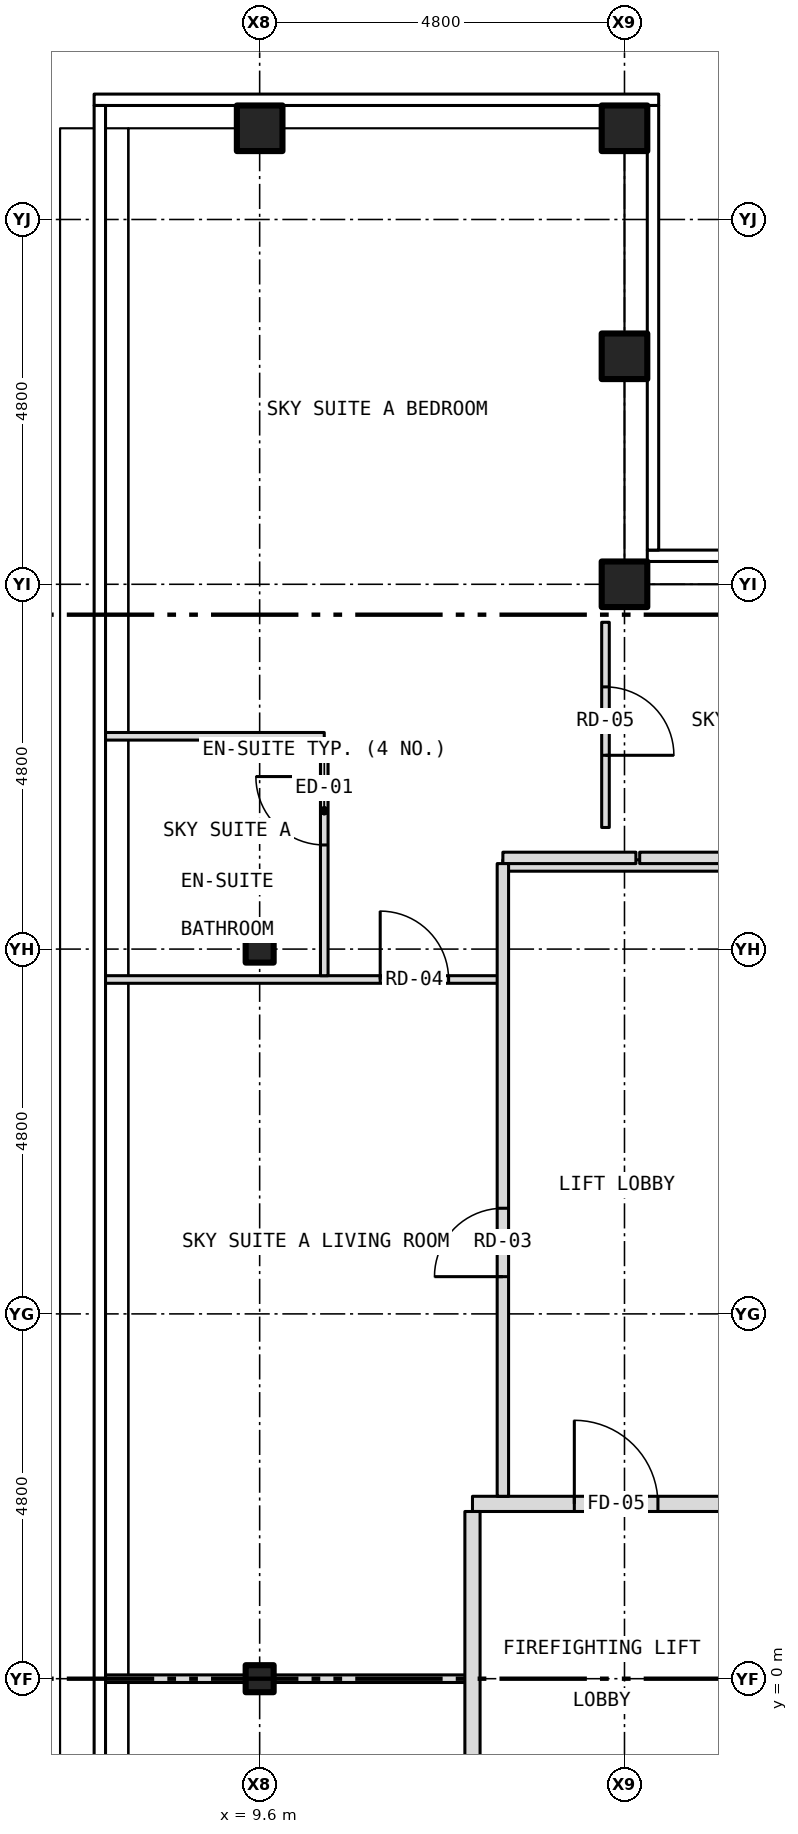
"""IFC4 building model, lengths in metres.
Left out: names, types, materials, properties, quantities, classifications, styles, units other than length and angle.
Written with IfcOpenShell. Run it as: python <this file> out.ifc"""

import sys

from ifc_helpers import new_model, si_unit, direction, frame, frame_2d, origin, origin_2d, place, context, subcontext, project, spatial, rectangle, hollow_rectangle, i_section, extrude, element, fill, save


model = new_model("IFC4")
c1 = context("Model", 3, precision=1e-05, world=origin(), true_north=direction((0.0, 1.0)))
c2 = subcontext(c1, "Body", "Model", "MODEL_VIEW")
j1 = project(units=[si_unit("LENGTHUNIT", "METRE"), si_unit("PLANEANGLEUNIT", "RADIAN")], contexts=[c1])
p1 = place(None, origin())
s1 = spatial("IfcSite", under=j1, at=p1, CompositionType="ELEMENT")
p2 = place(p1, origin())
s2 = spatial("IfcBuilding", under=s1, at=p2, CompositionType="ELEMENT")
p3 = place(p2, frame((0.0, 0.0, 269.0)))
s3 = spatial("IfcBuildingStorey", under=s2, at=p3, CompositionType="ELEMENT", Elevation=269.0)
for number, where, z_axis, x_axis in (
    (1, (9.6, 20.4, -0.15), (0.0, 0.0, 1.0), (1.0, 0.0, 0.0)),
    (2, (14.4, 20.4, -0.15), (0.0, 0.0, 1.0), (1.0, 0.0, 0.0)),
    (3, (14.4, 14.4, -0.15), (0.0, 0.0, 1.0), (1.0, 0.0, 0.0)),
    (4, (14.4, 17.4, -0.15), (0.0, 0.0, 1.0), (1.0, 0.0, 0.0)),
):
    element("IfcColumn", number, at=place(p3, frame(where, z_axis=z_axis, x_axis=x_axis)), inside=s3, PredefinedType="COLUMN", context=c2, shape_type="SweptSolid", body=[
        extrude(hollow_rectangle(XDim=0.6, YDim=0.6, WallThickness=0.03, at=origin_2d()), origin(), (0.0, 0.0, 1.0), 3.5),
    ])
for number, where, z_axis, x_axis in (
    (5, (9.6, 0.0, -0.15), (0.0, 0.0, 1.0), (1.0, 0.0, 0.0)),
    (6, (9.6, 9.6, -0.15), (0.0, 0.0, 1.0), (1.0, 0.0, 0.0)),
):
    element("IfcColumn", number, at=place(p3, frame(where, z_axis=z_axis, x_axis=x_axis)), inside=s3, PredefinedType="COLUMN", context=c2, shape_type="SweptSolid", body=[
        extrude(i_section(OverallWidth=0.368, OverallDepth=0.356, WebThickness=0.011, FlangeThickness=0.018, at=origin_2d()), origin(), (0.0, 0.0, 1.0), 3.5),
    ])
p4 = place(p3, frame((7.542, 0.0, 0.0), z_axis=(0.0, 0.0, 1.0), x_axis=(1.0, 0.0, 0.0)))
e7 = element("IfcWall", 7, at=p4, inside=s3, PredefinedType="PARTITIONING", context=c2, shape_type="SweptSolid", body=[
    extrude(rectangle(XDim=1.874, YDim=0.1, at=frame_2d((0.937, 0.0))), origin(), (0.0, 0.0, 1.0), 2.728),
])
p5 = place(p3, frame((9.416, 0.0, 0.0), z_axis=(0.0, 0.0, 1.0), x_axis=(1.0, 0.0, 0.0)))
e8 = element("IfcWall", 8, at=p5, inside=s3, PredefinedType="PARTITIONING", context=c2, shape_type="SweptSolid", body=[
    extrude(rectangle(XDim=0.368, YDim=0.1, at=frame_2d((0.184, 0.0))), origin(), (0.0, 0.0, 1.0), 3.35),
])
p6 = place(p3, frame((9.784, 0.0, 0.0), z_axis=(0.0, 0.0, 1.0), x_axis=(1.0, 0.0, 0.0)))
e9 = element("IfcWall", 9, at=p6, inside=s3, PredefinedType="PARTITIONING", context=c2, shape_type="SweptSolid", body=[
    extrude(rectangle(XDim=2.616, YDim=0.1, at=frame_2d((1.308, 0.0))), origin(), (0.0, 0.0, 1.0), 2.728),
])
p7 = place(p3, frame((12.4, 2.3, 0.0), z_axis=(0.0, 0.0, 1.0), x_axis=(1.0, 0.0, 0.0)))
e10 = element("IfcWall", 10, at=p7, inside=s3, PredefinedType="PARTITIONING", context=c2, shape_type="SweptSolid", body=[
    extrude(rectangle(XDim=3.28, YDim=0.2, at=frame_2d((1.64, 0.0))), origin(), (0.0, 0.0, 1.0), 3.35),
])
p8 = place(p7, frame((1.34, 0.0, 0.0)))
e11 = element("IfcOpeningElement", 11, at=p8, cuts=e10, PredefinedType="OPENING", context=c2, shape_type="SweptSolid", body=[
    extrude(rectangle(XDim=1.1, YDim=2.1, at=frame_2d((0.55, 1.05))), frame((0.0, 0.112, 0.0), z_axis=(0.0, -1.0, 0.0), x_axis=(1.0, 0.0, 0.0)), (0.0, 0.0, 1.0), 0.224),
])
p9 = place(p3, frame((7.542, 9.2, 0.0), z_axis=(0.0, 0.0, 1.0), x_axis=(1.0, 0.0, 0.0)))
e12 = element("IfcWall", 12, at=p9, inside=s3, PredefinedType="PARTITIONING", context=c2, shape_type="SweptSolid", body=[
    extrude(rectangle(XDim=5.258, YDim=0.1, at=frame_2d((2.629, 0.0))), origin(), (0.0, 0.0, 1.0), 3.35),
])
p10 = place(p9, frame((3.644, 0.0, 0.0)))
e13 = element("IfcOpeningElement", 13, at=p10, cuts=e12, PredefinedType="OPENING", context=c2, shape_type="SweptSolid", body=[
    extrude(rectangle(XDim=0.9, YDim=2.1, at=frame_2d((0.45, 1.05))), frame((0.0, 0.062, 0.0), z_axis=(0.0, -1.0, 0.0), x_axis=(1.0, 0.0, 0.0)), (0.0, 0.0, 1.0), 0.124),
])
p11 = place(p3, frame((12.8, 10.7, 0.0), z_axis=(0.0, 0.0, 1.0), x_axis=(1.0, 0.0, 0.0)))
e14 = element("IfcWall", 14, at=p11, inside=s3, PredefinedType="PARTITIONING", context=c2, shape_type="SweptSolid", body=[
    extrude(rectangle(XDim=2.88, YDim=0.15, at=frame_2d((1.44, 0.0))), origin(), (0.0, 0.0, 1.0), 3.35),
])
p12 = place(p3, frame((12.8, 10.8, 0.0), z_axis=(0.0, 0.0, 1.0), x_axis=(1.0, 0.0, 0.0)))
e15 = element("IfcWall", 15, at=p12, inside=s3, PredefinedType="PARTITIONING", context=c2, shape_type="SweptSolid", body=[
    extrude(rectangle(XDim=1.75, YDim=0.15, at=frame_2d((0.875, 0.0))), origin(), (0.0, 0.0, 1.0), 3.35),
])
p13 = place(p3, frame((14.6, 10.8, 0.0), z_axis=(0.0, 0.0, 1.0), x_axis=(1.0, 0.0, 0.0)))
e16 = element("IfcWall", 16, at=p13, inside=s3, PredefinedType="PARTITIONING", context=c2, shape_type="SweptSolid", body=[
    extrude(rectangle(XDim=1.08, YDim=0.15, at=frame_2d((0.54, 0.0))), origin(), (0.0, 0.0, 1.0), 3.35),
])
p14 = place(p3, frame((7.542, 12.4, 0.0), z_axis=(0.0, 0.0, 1.0), x_axis=(1.0, 0.0, 0.0)))
e17 = element("IfcWall", 17, at=p14, inside=s3, PredefinedType="PARTITIONING", context=c2, shape_type="SweptSolid", body=[
    extrude(rectangle(XDim=2.908, YDim=0.1, at=frame_2d((1.454, 0.0))), origin(), (0.0, 0.0, 1.0), 3.35),
])
p15 = place(p3, frame((10.45, 9.25, 0.0), z_axis=(0.0, 0.0, 1.0), x_axis=(0.0, 1.0, 0.0)))
e18 = element("IfcWall", 18, at=p15, inside=s3, PredefinedType="PARTITIONING", context=c2, shape_type="SweptSolid", body=[
    extrude(rectangle(XDim=3.1, YDim=0.1, at=frame_2d((1.55, 0.0))), origin(), (0.0, 0.0, 1.0), 3.35),
])
p16 = place(p15, frame((1.72, 0.0, 0.0)))
e19 = element("IfcOpeningElement", 19, at=p16, cuts=e18, PredefinedType="OPENING", context=c2, shape_type="SweptSolid", body=[
    extrude(rectangle(XDim=0.9, YDim=2.1, at=frame_2d((0.45, 1.05))), frame((0.0, 0.062, 0.0), z_axis=(0.0, -1.0, 0.0), x_axis=(1.0, 0.0, 0.0)), (0.0, 0.0, 1.0), 0.124),
])
p17 = place(p3, frame((12.4, -1.8, 0.0), z_axis=(0.0, 0.0, 1.0), x_axis=(0.0, 1.0, 0.0)))
e20 = element("IfcWall", 20, at=p17, inside=s3, PredefinedType="PARTITIONING", context=c2, shape_type="SweptSolid", body=[
    extrude(rectangle(XDim=4.0, YDim=0.2, at=frame_2d((2.0, 0.0))), origin(), (0.0, 0.0, 1.0), 3.35),
])
p18 = place(p3, frame((12.8, 2.4, 0.0), z_axis=(0.0, 0.0, 1.0), x_axis=(0.0, 1.0, 0.0)))
e21 = element("IfcWall", 21, at=p18, inside=s3, PredefinedType="PARTITIONING", context=c2, shape_type="SweptSolid", body=[
    extrude(rectangle(XDim=8.325, YDim=0.15, at=frame_2d((4.163, 0.0))), origin(), (0.0, 0.0, 1.0), 3.35),
])
p19 = place(p18, frame((2.89, 0.0, 0.0)))
e22 = element("IfcOpeningElement", 22, at=p19, cuts=e21, PredefinedType="OPENING", context=c2, shape_type="SweptSolid", body=[
    extrude(rectangle(XDim=0.9, YDim=2.1, at=frame_2d((0.45, 1.05))), frame((0.0, 0.087, 0.0), z_axis=(0.0, -1.0, 0.0), x_axis=(1.0, 0.0, 0.0)), (0.0, 0.0, 1.0), 0.174),
])
p20 = place(p3, frame((14.15, 11.2, 0.0), z_axis=(0.0, 0.0, 1.0), x_axis=(0.0, 1.0, 0.0)))
e23 = element("IfcWall", 23, at=p20, inside=s3, PredefinedType="PARTITIONING", context=c2, shape_type="SweptSolid", body=[
    extrude(rectangle(XDim=2.7, YDim=0.1, at=frame_2d((1.35, 0.0))), origin(), (0.0, 0.0, 1.0), 3.35),
])
p21 = place(p20, frame((0.95, 0.0, 0.0)))
e24 = element("IfcOpeningElement", 24, at=p21, cuts=e23, PredefinedType="OPENING", context=c2, shape_type="SweptSolid", body=[
    extrude(rectangle(XDim=0.9, YDim=2.1, at=frame_2d((0.45, 1.05))), frame((0.0, 0.062, 0.0), z_axis=(0.0, -1.0, 0.0), x_axis=(1.0, 0.0, 0.0)), (0.0, 0.0, 1.0), 0.124),
])
p22 = place(p8, origin())
e25 = element("IfcDoor", 25, at=p22, inside=s3, OperationType="SINGLE_SWING_LEFT", PredefinedType="DOOR", context=c2, shape_type="SweptSolid", body=[
    extrude(rectangle(XDim=1.1, YDim=2.1, at=frame_2d((0.55, 1.05))), frame((0.0, 0.025, 0.0), z_axis=(0.0, -1.0, 0.0), x_axis=(1.0, 0.0, 0.0)), (0.0, 0.0, 1.0), 0.05),
])
fill(e11, e25)
p23 = place(p19, origin())
e26 = element("IfcDoor", 26, at=p23, inside=s3, OperationType="SINGLE_SWING_LEFT", PredefinedType="DOOR", context=c2, shape_type="SweptSolid", body=[
    extrude(rectangle(XDim=0.9, YDim=2.1, at=frame_2d((0.45, 1.05))), frame((0.0, 0.025, 0.0), z_axis=(0.0, -1.0, 0.0), x_axis=(1.0, 0.0, 0.0)), (0.0, 0.0, 1.0), 0.05),
])
fill(e22, e26)
p24 = place(p10, origin())
e27 = element("IfcDoor", 27, at=p24, inside=s3, OperationType="SINGLE_SWING_LEFT", PredefinedType="DOOR", context=c2, shape_type="SweptSolid", body=[
    extrude(rectangle(XDim=0.9, YDim=2.1, at=frame_2d((0.45, 1.05))), frame((0.0, 0.025, 0.0), z_axis=(0.0, -1.0, 0.0), x_axis=(1.0, 0.0, 0.0)), (0.0, 0.0, 1.0), 0.05),
])
fill(e13, e27)
p25 = place(p16, origin())
e28 = element("IfcDoor", 28, at=p25, inside=s3, OperationType="SINGLE_SWING_RIGHT", PredefinedType="DOOR", context=c2, shape_type="SweptSolid", body=[
    extrude(rectangle(XDim=0.9, YDim=2.1, at=frame_2d((0.45, 1.05))), frame((0.0, 0.025, 0.0), z_axis=(0.0, -1.0, 0.0), x_axis=(1.0, 0.0, 0.0)), (0.0, 0.0, 1.0), 0.05),
])
fill(e19, e28)
p26 = place(p21, origin())
e29 = element("IfcDoor", 29, at=p26, inside=s3, OperationType="SINGLE_SWING_LEFT", PredefinedType="DOOR", context=c2, shape_type="SweptSolid", body=[
    extrude(rectangle(XDim=0.9, YDim=2.1, at=frame_2d((0.45, 1.05))), frame((0.0, 0.025, 0.0), z_axis=(0.0, -1.0, 0.0), x_axis=(1.0, 0.0, 0.0)), (0.0, 0.0, 1.0), 0.05),
])
fill(e24, e29)
save(model, sys.argv[1])
